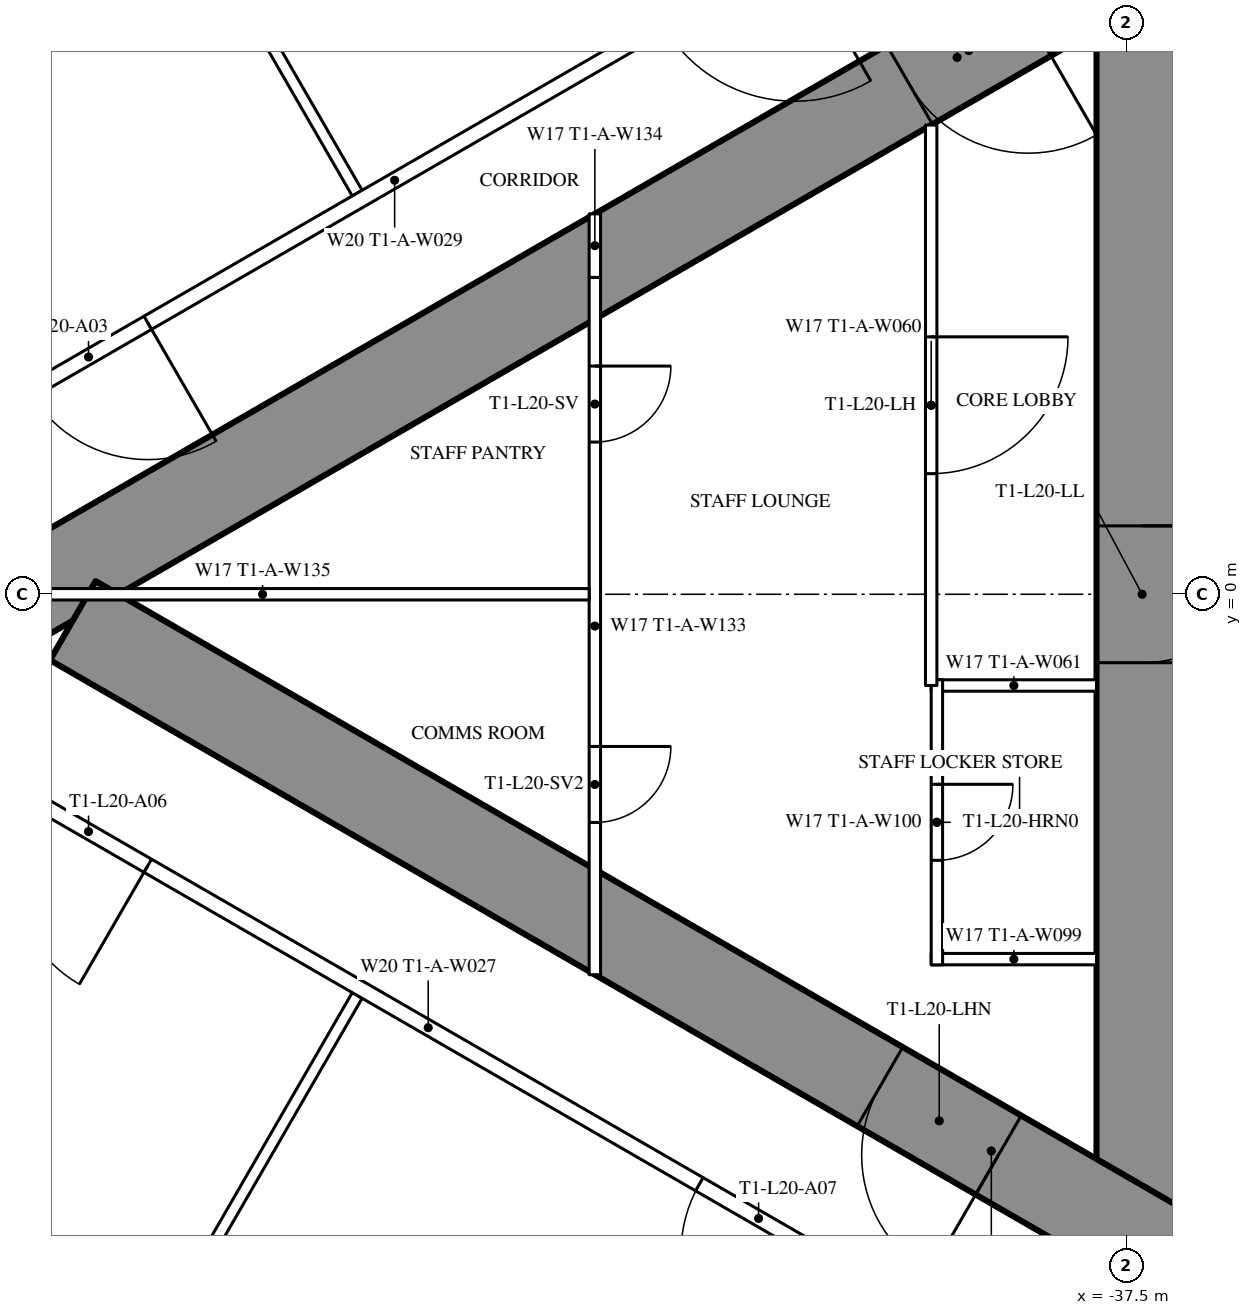
"""IFC4 building model, lengths in metres.
Left out: names, types, materials, properties, quantities, classifications, styles, units other than length and angle.
Written with IfcOpenShell. Run it as: python <this file> out.ifc"""

import sys

from ifc_helpers import new_model, si_unit, direction, frame, frame_2d, origin, place, context, subcontext, project, spatial, rectangle, extrude, element, fill, save


model = new_model("IFC4")
c1 = context("Model", 3, precision=1e-05, world=origin(), true_north=direction((0.0, 1.0)))
c2 = subcontext(c1, "Body", "Model", "MODEL_VIEW")
j1 = project(units=[si_unit("LENGTHUNIT", "METRE"), si_unit("PLANEANGLEUNIT", "RADIAN")], contexts=[c1])
p1 = place(None, origin())
s1 = spatial("IfcSite", under=j1, at=p1, CompositionType="ELEMENT")
p2 = place(p1, origin())
s2 = spatial("IfcBuilding", under=s1, at=p2, CompositionType="ELEMENT")
p3 = place(p2, frame((0.0, 0.0, 77.5)))
s3 = spatial("IfcBuildingStorey", under=s2, at=p3, CompositionType="ELEMENT", Elevation=77.5)
p4 = place(p3, frame((-37.3, 8.6, 0.0), z_axis=(0.0, 0.0, 1.0), x_axis=(0.0, -1.0, 0.0)))
e1 = element("IfcWall", 1, at=p4, inside=s3, PredefinedType="SHEAR", context=c2, shape_type="SweptSolid", body=[
    extrude(rectangle(XDim=17.2, YDim=1.2, at=frame_2d((8.6, 0.0))), origin(), (0.0, 0.0, 1.0), 3.5),
])
p5 = place(p4, frame((7.7, 0.0, 0.0)))
e2 = element("IfcOpeningElement", 2, at=p5, cuts=e1, PredefinedType="OPENING", context=c2, shape_type="SweptSolid", body=[
    extrude(rectangle(XDim=1.8, YDim=2.2, at=frame_2d((0.9, 1.1))), frame((0.0, 0.61, 0.0), z_axis=(0.0, -1.0, 0.0), x_axis=(1.0, 0.0, 0.0)), (0.0, 0.0, 1.0), 1.22),
])
p6 = place(p3, frame((-27.2, 14.3, 0.0), z_axis=(0.0, 0.0, 1.0), x_axis=(-0.866026593062, -0.499997940104, 0.0)))
e3 = element("IfcWall", 3, at=p6, inside=s3, PredefinedType="SHEAR", context=c2, shape_type="SweptSolid", body=[
    extrude(rectangle(XDim=28.946, YDim=1.2, at=frame_2d((14.473, 0.0))), origin(), (0.0, 0.0, 1.0), 3.5),
])
p7 = place(p6, frame((5.85, 0.0, 0.0)))
e4 = element("IfcOpeningElement", 4, at=p7, cuts=e3, PredefinedType="OPENING", context=c2, shape_type="SweptSolid", body=[
    extrude(rectangle(XDim=1.0, YDim=2.2, at=frame_2d((0.5, 1.1))), frame((0.0, 0.61, 0.0), z_axis=(0.0, -1.0, 0.0), x_axis=(1.0, 0.0, 0.0)), (0.0, 0.0, 1.0), 1.22),
])
p8 = place(p6, frame((13.395, 0.0, 0.0)))
e5 = element("IfcOpeningElement", 5, at=p8, cuts=e3, PredefinedType="OPENING", context=c2, shape_type="SweptSolid", body=[
    extrude(rectangle(XDim=1.8, YDim=2.04, at=frame_2d((0.9, 1.02))), frame((0.0, 0.61, 0.0), z_axis=(0.0, -1.0, 0.0), x_axis=(1.0, 0.0, 0.0)), (0.0, 0.0, 1.0), 1.22),
])
p9 = place(p3, frame((-27.2, -14.3, 0.0), z_axis=(0.0, 0.0, 1.0), x_axis=(-0.866024021859, 0.500002393557, 0.0)))
e6 = element("IfcWall", 6, at=p9, inside=s3, PredefinedType="SHEAR", context=c2, shape_type="SweptSolid", body=[
    extrude(rectangle(XDim=27.907, YDim=1.2, at=frame_2d((13.954, 0.0))), origin(), (0.0, 0.0, 1.0), 3.5),
])
p10 = place(p9, frame((4.6, 0.0, 0.0)))
e7 = element("IfcOpeningElement", 7, at=p10, cuts=e6, PredefinedType="OPENING", context=c2, shape_type="SweptSolid", body=[
    extrude(rectangle(XDim=1.0, YDim=2.2, at=frame_2d((0.5, 1.1))), frame((0.0, 0.61, 0.0), z_axis=(0.0, -1.0, 0.0), x_axis=(1.0, 0.0, 0.0)), (0.0, 0.0, 1.0), 1.22),
])
p11 = place(p9, frame((13.845, 0.0, 0.0)))
e8 = element("IfcOpeningElement", 8, at=p11, cuts=e6, PredefinedType="OPENING", context=c2, shape_type="SweptSolid", body=[
    extrude(rectangle(XDim=1.8, YDim=2.2, at=frame_2d((0.9, 1.1))), frame((0.0, 0.61, 0.0), z_axis=(0.0, -1.0, 0.0), x_axis=(1.0, 0.0, 0.0)), (0.0, 0.0, 1.0), 1.22),
])
for number, where, z_axis, x_axis in (
    (9, (-47.627, 5.278, 0.0), (0.0, 0.0, 1.0), (-0.5, 0.866, 0.0)),
    (10, (-47.627, -5.278, 0.0), (0.0, 0.0, 1.0), (-0.5, -0.866, 0.0)),
):
    element("IfcWall", number, at=place(p3, frame(where, z_axis=z_axis, x_axis=x_axis)), inside=s3, PredefinedType="PARTITIONING", context=c2, shape_type="SweptSolid", body=[
        extrude(rectangle(XDim=9.51, YDim=0.15, at=frame_2d((4.755, 0.0))), origin(), (0.0, 0.0, 1.0), 2.05),
    ])
p12 = place(p3, frame((-37.7, 10.894, 0.0), z_axis=(0.0, 0.0, 1.0), x_axis=(-0.866027905338, -0.499995667157, 0.0)))
e11 = element("IfcWall", 11, at=p12, inside=s3, PredefinedType="PARTITIONING", context=c2, shape_type="SweptSolid", body=[
    extrude(rectangle(XDim=21.787, YDim=0.2, at=frame_2d((10.894, 0.0))), origin(), (0.0, 0.0, 1.0), 3.25),
])
p13 = place(p12, frame((14.644, 0.0, 0.0)))
e12 = element("IfcOpeningElement", 12, at=p13, cuts=e11, PredefinedType="OPENING", context=c2, shape_type="SweptSolid", body=[
    extrude(rectangle(XDim=1.8, YDim=2.2, at=frame_2d((0.9, 1.1))), frame((0.0, 0.11, 0.0), z_axis=(0.0, -1.0, 0.0), x_axis=(1.0, 0.0, 0.0)), (0.0, 0.0, 1.0), 0.22),
])
p14 = place(p12, frame((19.958, 0.0, 0.0)))
e13 = element("IfcOpeningElement", 13, at=p14, cuts=e11, PredefinedType="OPENING", context=c2, shape_type="SweptSolid", body=[
    extrude(rectangle(XDim=1.329, YDim=2.04, at=frame_2d((0.665, 1.02))), frame((0.0, 0.11, 0.0), z_axis=(0.0, -1.0, 0.0), x_axis=(1.0, 0.0, 0.0)), (0.0, 0.0, 1.0), 0.22),
])
p15 = place(p12, frame((4.815, 0.0, 0.0)))
e14 = element("IfcOpeningElement", 14, at=p15, cuts=e11, PredefinedType="OPENING", context=c2, shape_type="SweptSolid", body=[
    extrude(rectangle(XDim=2.0, YDim=2.4, at=frame_2d((1.0, 1.2))), frame((0.0, 0.11, 0.0), z_axis=(0.0, -1.0, 0.0), x_axis=(1.0, 0.0, 0.0)), (0.0, 0.0, 1.0), 0.22),
])
p16 = place(p3, frame((-36.92, -11.344, 0.0), z_axis=(0.0, 0.0, 1.0), x_axis=(-0.866028313256, 0.499994960614, 0.0)))
e15 = element("IfcWall", 15, at=p16, inside=s3, PredefinedType="PARTITIONING", context=c2, shape_type="SweptSolid", body=[
    extrude(rectangle(XDim=22.568, YDim=0.2, at=frame_2d((11.284, 0.0))), origin(), (0.0, 0.0, 1.0), 3.25),
])
p17 = place(p16, frame((20.808, 0.0, 0.0)))
e16 = element("IfcOpeningElement", 16, at=p17, cuts=e15, PredefinedType="OPENING", context=c2, shape_type="SweptSolid", body=[
    extrude(rectangle(XDim=1.209, YDim=2.2, at=frame_2d((0.604, 1.1))), frame((0.0, 0.11, 0.0), z_axis=(0.0, -1.0, 0.0), x_axis=(1.0, 0.0, 0.0)), (0.0, 0.0, 1.0), 0.22),
])
p18 = place(p16, frame((15.544, 0.0, 0.0)))
e17 = element("IfcOpeningElement", 17, at=p18, cuts=e15, PredefinedType="OPENING", context=c2, shape_type="SweptSolid", body=[
    extrude(rectangle(XDim=1.8, YDim=2.2, at=frame_2d((0.9, 1.1))), frame((0.0, 0.11, 0.0), z_axis=(0.0, -1.0, 0.0), x_axis=(1.0, 0.0, 0.0)), (0.0, 0.0, 1.0), 0.22),
])
p19 = place(p16, frame((5.365, 0.0, 0.0)))
e18 = element("IfcOpeningElement", 18, at=p19, cuts=e15, PredefinedType="OPENING", context=c2, shape_type="SweptSolid", body=[
    extrude(rectangle(XDim=1.8, YDim=2.2, at=frame_2d((0.9, 1.1))), frame((0.0, 0.11, 0.0), z_axis=(0.0, -1.0, 0.0), x_axis=(1.0, 0.0, 0.0)), (0.0, 0.0, 1.0), 0.22),
])
for number, where, z_axis, x_axis in (
    (19, (-37.9, -1.2, 0.0), (0.0, 0.0, 1.0), (-1.0, 0.0, 0.0)),
    (20, (-37.9, -4.8, 0.0), (0.0, 0.0, 1.0), (-1.0, 0.0, 0.0)),
):
    element("IfcWall", number, at=place(p3, frame(where, z_axis=z_axis, x_axis=x_axis)), inside=s3, PredefinedType="PARTITIONING", context=c2, shape_type="SweptSolid", body=[
        extrude(rectangle(XDim=2.175, YDim=0.15, at=frame_2d((1.087, 0.0))), origin(), (0.0, 0.0, 1.0), 3.25),
    ])
p20 = place(p3, frame((-40.0, -1.125, 0.0), z_axis=(0.0, 0.0, 1.0), x_axis=(0.0, -1.0, 0.0)))
e21 = element("IfcWall", 21, at=p20, inside=s3, PredefinedType="PARTITIONING", context=c2, shape_type="SweptSolid", body=[
    extrude(rectangle(XDim=3.75, YDim=0.15, at=frame_2d((1.875, 0.0))), origin(), (0.0, 0.0, 1.0), 3.25),
])
p21 = place(p20, frame((1.375, 0.0, 0.0)))
e22 = element("IfcOpeningElement", 22, at=p21, cuts=e21, PredefinedType="OPENING", context=c2, shape_type="SweptSolid", body=[
    extrude(rectangle(XDim=1.0, YDim=2.2, at=frame_2d((0.5, 1.1))), frame((0.0, 0.085, 0.0), z_axis=(0.0, -1.0, 0.0), x_axis=(1.0, 0.0, 0.0)), (0.0, 0.0, 1.0), 0.17),
])
p22 = place(p3, frame((-40.075, 6.174, 0.0), z_axis=(0.0, 0.0, 1.0), x_axis=(0.0, -1.0, 0.0)))
e23 = element("IfcWall", 23, at=p22, inside=s3, PredefinedType="PARTITIONING", context=c2, shape_type="SweptSolid", body=[
    extrude(rectangle(XDim=7.374, YDim=0.15, at=frame_2d((3.687, 0.0))), origin(), (0.0, 0.0, 1.0), 3.25),
])
p23 = place(p22, frame((2.787, 0.0, 0.0)))
e24 = element("IfcOpeningElement", 24, at=p23, cuts=e23, PredefinedType="OPENING", context=c2, shape_type="SweptSolid", body=[
    extrude(rectangle(XDim=1.8, YDim=2.2, at=frame_2d((0.9, 1.1))), frame((0.0, 0.085, 0.0), z_axis=(0.0, -1.0, 0.0), x_axis=(1.0, 0.0, 0.0)), (0.0, 0.0, 1.0), 0.17),
])
p24 = place(p3, frame((-44.5, 4.169, 0.0), z_axis=(0.0, 0.0, 1.0), x_axis=(0.0, -1.0, 0.0)))
e25 = element("IfcWall", 25, at=p24, inside=s3, PredefinedType="PARTITIONING", context=c2, shape_type="SweptSolid", body=[
    extrude(rectangle(XDim=9.173, YDim=0.15, at=frame_2d((4.587, 0.0))), origin(), (0.0, 0.0, 1.0), 3.25),
])
p25 = place(p24, frame((1.167, 0.0, 0.0)))
e26 = element("IfcOpeningElement", 26, at=p25, cuts=e25, PredefinedType="OPENING", context=c2, shape_type="SweptSolid", body=[
    extrude(rectangle(XDim=1.0, YDim=2.2, at=frame_2d((0.5, 1.1))), frame((0.0, 0.085, 0.0), z_axis=(0.0, -1.0, 0.0), x_axis=(1.0, 0.0, 0.0)), (0.0, 0.0, 1.0), 0.17),
])
p26 = place(p24, frame((6.171, 0.0, 0.0)))
e27 = element("IfcOpeningElement", 27, at=p26, cuts=e25, PredefinedType="OPENING", context=c2, shape_type="SweptSolid", body=[
    extrude(rectangle(XDim=1.0, YDim=2.2, at=frame_2d((0.5, 1.1))), frame((0.0, 0.085, 0.0), z_axis=(0.0, -1.0, 0.0), x_axis=(1.0, 0.0, 0.0)), (0.0, 0.0, 1.0), 0.17),
])
p27 = place(p3, frame((-44.575, 0.0, 0.0), z_axis=(0.0, 0.0, 1.0), x_axis=(-1.0, 0.0, 0.0)))
e28 = element("IfcWall", 28, at=p27, inside=s3, PredefinedType="PARTITIONING", context=c2, shape_type="SweptSolid", body=[
    extrude(rectangle(XDim=8.593, YDim=0.15, at=frame_2d((4.297, 0.0))), origin(), (0.0, 0.0, 1.0), 2.05),
])
p28 = place(p3, frame((-44.5, 5.005, 0.0), z_axis=(0.0, 0.0, 1.0), x_axis=(0.0, -1.0, 0.0)))
e29 = element("IfcWall", 29, at=p28, inside=s3, PredefinedType="PARTITIONING", context=c2, shape_type="SweptSolid", body=[
    extrude(rectangle(XDim=0.836, YDim=0.15, at=frame_2d((0.418, 0.0))), origin(), (0.0, 0.0, 1.0), 2.05),
])
p29 = place(p13, origin())
e30 = element("IfcDoor", 30, at=p29, inside=s3, OperationType="DOUBLE_DOOR_SINGLE_SWING", PredefinedType="DOOR", context=c2, shape_type="SweptSolid", body=[
    extrude(rectangle(XDim=1.8, YDim=2.2, at=frame_2d((0.9, 1.1))), frame((0.0, 0.025, 0.0), z_axis=(0.0, -1.0, 0.0), x_axis=(1.0, 0.0, 0.0)), (0.0, 0.0, 1.0), 0.05),
])
fill(e12, e30)
p30 = place(p18, origin())
e31 = element("IfcDoor", 31, at=p30, inside=s3, OperationType="DOUBLE_DOOR_SINGLE_SWING", PredefinedType="DOOR", context=c2, shape_type="SweptSolid", body=[
    extrude(rectangle(XDim=1.8, YDim=2.2, at=frame_2d((0.9, 1.1))), frame((0.0, 0.025, 0.0), z_axis=(0.0, -1.0, 0.0), x_axis=(1.0, 0.0, 0.0)), (0.0, 0.0, 1.0), 0.05),
])
fill(e17, e31)
p31 = place(p19, origin())
e32 = element("IfcDoor", 32, at=p31, inside=s3, OperationType="DOUBLE_DOOR_SINGLE_SWING", PredefinedType="DOOR", context=c2, shape_type="SweptSolid", body=[
    extrude(rectangle(XDim=1.8, YDim=2.2, at=frame_2d((0.9, 1.1))), frame((0.0, 0.025, 0.0), z_axis=(0.0, -1.0, 0.0), x_axis=(1.0, 0.0, 0.0)), (0.0, 0.0, 1.0), 0.05),
])
fill(e18, e32)
p32 = place(p21, origin())
e33 = element("IfcDoor", 33, at=p32, inside=s3, OperationType="SINGLE_SWING_LEFT", PredefinedType="DOOR", context=c2, shape_type="SweptSolid", body=[
    extrude(rectangle(XDim=1.0, YDim=2.2, at=frame_2d((0.5, 1.1))), frame((0.0, 0.025, 0.0), z_axis=(0.0, -1.0, 0.0), x_axis=(1.0, 0.0, 0.0)), (0.0, 0.0, 1.0), 0.05),
])
fill(e22, e33)
p33 = place(p23, origin())
e34 = element("IfcDoor", 34, at=p33, inside=s3, OperationType="DOUBLE_DOOR_SINGLE_SWING", PredefinedType="DOOR", context=c2, shape_type="SweptSolid", body=[
    extrude(rectangle(XDim=1.8, YDim=2.2, at=frame_2d((0.9, 1.1))), frame((0.0, 0.025, 0.0), z_axis=(0.0, -1.0, 0.0), x_axis=(1.0, 0.0, 0.0)), (0.0, 0.0, 1.0), 0.05),
])
fill(e24, e34)
p34 = place(p25, origin())
e35 = element("IfcDoor", 35, at=p34, inside=s3, OperationType="SINGLE_SWING_LEFT", PredefinedType="DOOR", context=c2, shape_type="SweptSolid", body=[
    extrude(rectangle(XDim=1.0, YDim=2.2, at=frame_2d((0.5, 1.1))), frame((0.0, 0.025, 0.0), z_axis=(0.0, -1.0, 0.0), x_axis=(1.0, 0.0, 0.0)), (0.0, 0.0, 1.0), 0.05),
])
fill(e26, e35)
p35 = place(p26, origin())
e36 = element("IfcDoor", 36, at=p35, inside=s3, OperationType="SINGLE_SWING_LEFT", PredefinedType="DOOR", context=c2, shape_type="SweptSolid", body=[
    extrude(rectangle(XDim=1.0, YDim=2.2, at=frame_2d((0.5, 1.1))), frame((0.0, 0.025, 0.0), z_axis=(0.0, -1.0, 0.0), x_axis=(1.0, 0.0, 0.0)), (0.0, 0.0, 1.0), 0.05),
])
fill(e27, e36)
p36 = place(p8, origin())
e37 = element("IfcDoor", 37, at=p36, inside=s3, OperationType="DOUBLE_DOOR_SINGLE_SWING", PredefinedType="DOOR", context=c2, shape_type="SweptSolid", body=[
    extrude(rectangle(XDim=1.8, YDim=2.04, at=frame_2d((0.9, 1.02))), frame((0.0, 0.025, 0.0), z_axis=(0.0, -1.0, 0.0), x_axis=(1.0, 0.0, 0.0)), (0.0, 0.0, 1.0), 0.05),
])
fill(e5, e37)
p37 = place(p11, origin())
e38 = element("IfcDoor", 38, at=p37, inside=s3, OperationType="DOUBLE_DOOR_SINGLE_SWING", PredefinedType="DOOR", context=c2, shape_type="SweptSolid", body=[
    extrude(rectangle(XDim=1.8, YDim=2.2, at=frame_2d((0.9, 1.1))), frame((0.0, 0.025, 0.0), z_axis=(0.0, -1.0, 0.0), x_axis=(1.0, 0.0, 0.0)), (0.0, 0.0, 1.0), 0.05),
])
fill(e8, e38)
p38 = place(p5, origin())
e39 = element("IfcDoor", 39, at=p38, inside=s3, OperationType="DOUBLE_DOOR_SINGLE_SWING", PredefinedType="DOOR", context=c2, shape_type="SweptSolid", body=[
    extrude(rectangle(XDim=1.8, YDim=2.2, at=frame_2d((0.9, 1.1))), frame((0.0, 0.025, 0.0), z_axis=(0.0, -1.0, 0.0), x_axis=(1.0, 0.0, 0.0)), (0.0, 0.0, 1.0), 0.05),
])
fill(e2, e39)
save(model, sys.argv[1])
